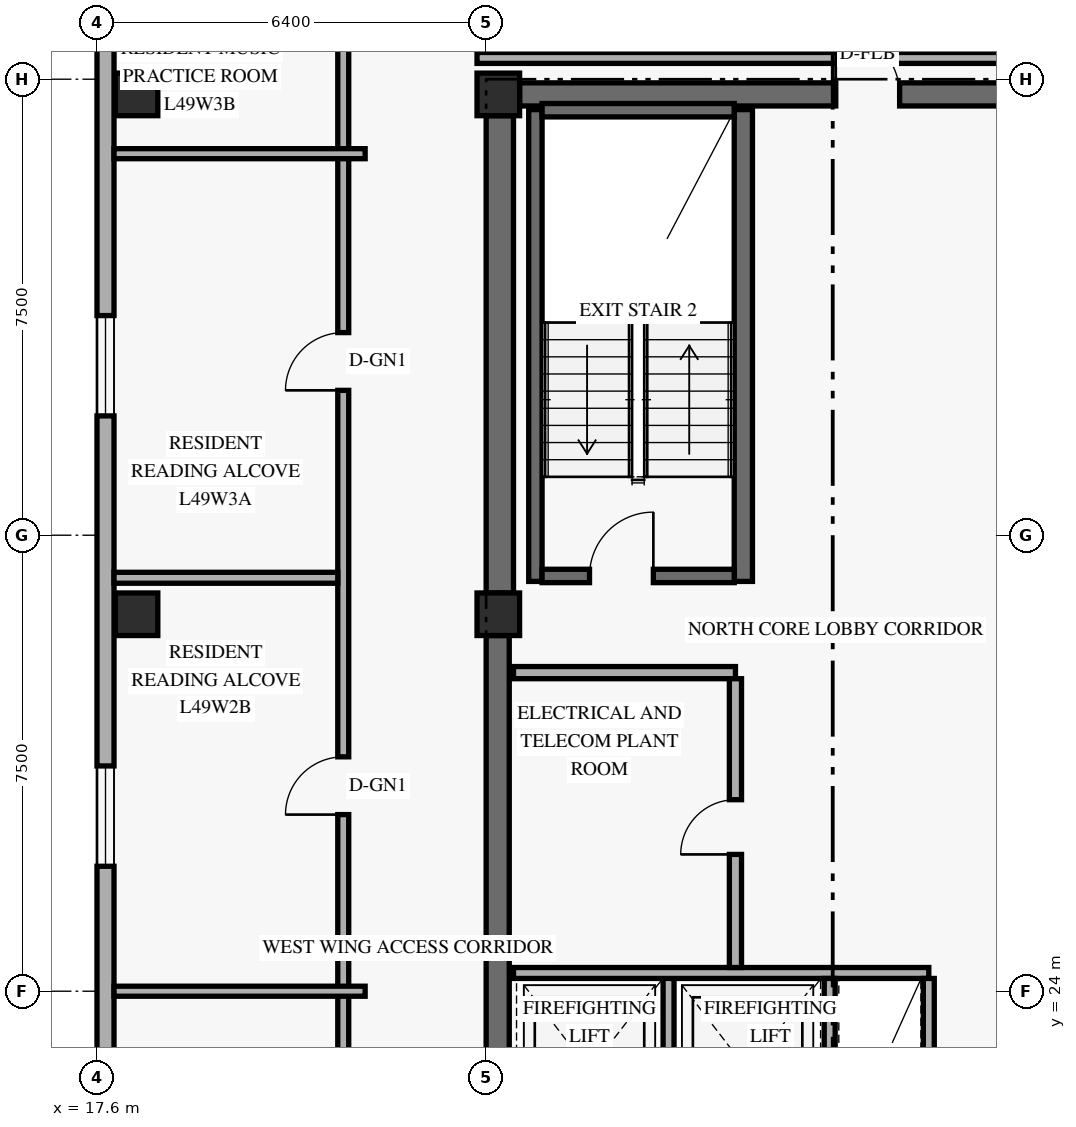
"""IFC4 building model, lengths in metres.
Left out: names, types, materials, properties, quantities, classifications, styles, units other than length and angle.
Written with IfcOpenShell. Run it as: python <this file> out.ifc"""

import sys

from ifc_helpers import new_model, si_unit, direction, frame, frame_2d, origin, origin_2d, place, context, subcontext, project, spatial, rectangle, extrude, element, fill, save


model = new_model("IFC4")
c1 = context("Model", 3, precision=1e-05, world=origin(), true_north=direction((0.0, 1.0)))
c2 = subcontext(c1, "Body", "Model", "MODEL_VIEW")
j1 = project(units=[si_unit("LENGTHUNIT", "METRE"), si_unit("PLANEANGLEUNIT", "RADIAN")], contexts=[c1])
p1 = place(None, origin())
s1 = spatial("IfcSite", under=j1, at=p1, CompositionType="ELEMENT")
p2 = place(p1, origin())
s2 = spatial("IfcBuilding", under=s1, at=p2, CompositionType="ELEMENT")
p3 = place(p2, frame((0.0, 0.0, 188.4)))
s3 = spatial("IfcBuildingStorey", under=s2, at=p3, CompositionType="ELEMENT", Elevation=188.4)
p4 = place(p3, frame((24.19, 17.9, 0.0), z_axis=(0.0, 0.0, 1.0), x_axis=(0.0, 1.0, 0.0)))
e1 = element("IfcWall", 1, at=p4, inside=s3, PredefinedType="SHEAR", context=c2, shape_type="SweptSolid", body=[
    extrude(rectangle(XDim=11.95, YDim=0.38, at=frame_2d((5.975, 0.0))), origin(), (0.0, 0.0, 1.0), 2.738),
])
p5 = place(p3, frame((24.225, 30.55, 0.0), z_axis=(0.0, 0.0, 1.0), x_axis=(0.0, 1.0, 0.0)))
e2 = element("IfcWall", 2, at=p5, inside=s3, PredefinedType="SHEAR", context=c2, shape_type="SweptSolid", body=[
    extrude(rectangle(XDim=7.85, YDim=0.45, at=frame_2d((3.925, 0.0))), origin(), (0.0, 0.0, 1.0), 2.738),
])
p6 = place(p3, frame((24.55, 38.75, 0.0), z_axis=(0.0, 0.0, 1.0), x_axis=(1.0, 0.0, 0.0)))
e3 = element("IfcWall", 3, at=p6, inside=s3, PredefinedType="SHEAR", context=c2, shape_type="SweptSolid", body=[
    extrude(rectangle(XDim=10.3, YDim=0.38, at=frame_2d((5.15, 0.0))), origin(), (0.0, 0.0, 1.0), 3.35),
])
p7 = place(p6, frame((5.2, 0.0, 0.0)))
e4 = element("IfcOpeningElement", 4, at=p7, cuts=e3, PredefinedType="OPENING", context=c2, shape_type="SweptSolid", body=[
    extrude(rectangle(XDim=1.05, YDim=2.15, at=frame_2d((0.525, 1.075))), frame((0.0, 0.2, 0.0), z_axis=(0.0, -1.0, 0.0), x_axis=(1.0, 0.0, 0.0)), (0.0, 0.0, 1.0), 0.4),
])
p8 = place(p3, frame((24.81, 30.74, 0.0), z_axis=(0.0, 0.0, 1.0), x_axis=(0.0, 1.0, 0.0)))
e5 = element("IfcWall", 5, at=p8, inside=s3, PredefinedType="SHEAR", context=c2, shape_type="SweptSolid", body=[
    extrude(rectangle(XDim=7.76, YDim=0.22, at=frame_2d((3.88, 0.0))), origin(), (0.0, 0.0, 1.0), 3.35),
])
p9 = place(p3, frame((28.23, 30.74, 0.0), z_axis=(0.0, 0.0, 1.0), x_axis=(0.0, 1.0, 0.0)))
e6 = element("IfcWall", 6, at=p9, inside=s3, PredefinedType="SHEAR", context=c2, shape_type="SweptSolid", body=[
    extrude(rectangle(XDim=7.76, YDim=0.3, at=frame_2d((3.88, 0.0))), origin(), (0.0, 0.0, 1.0), 3.35),
])
p10 = place(p3, frame((24.92, 30.83, 0.0), z_axis=(0.0, 0.0, 1.0), x_axis=(1.0, 0.0, 0.0)))
e7 = element("IfcWall", 7, at=p10, inside=s3, PredefinedType="SHEAR", context=c2, shape_type="SweptSolid", body=[
    extrude(rectangle(XDim=3.16, YDim=0.22, at=frame_2d((1.58, 0.0))), origin(), (0.0, 0.0, 1.0), 3.35),
])
p11 = place(p10, frame((0.78, 0.0, 0.0)))
e8 = element("IfcOpeningElement", 8, at=p11, cuts=e7, PredefinedType="OPENING", context=c2, shape_type="SweptSolid", body=[
    extrude(rectangle(XDim=1.05, YDim=2.15, at=frame_2d((0.525, 1.075))), frame((0.0, 0.12, 0.0), z_axis=(0.0, -1.0, 0.0), x_axis=(1.0, 0.0, 0.0)), (0.0, 0.0, 1.0), 0.24),
])
p12 = place(p3, frame((24.92, 38.49, 0.0), z_axis=(0.0, 0.0, 1.0), x_axis=(1.0, 0.0, 0.0)))
e9 = element("IfcWall", 9, at=p12, inside=s3, PredefinedType="SHEAR", context=c2, shape_type="SweptSolid", body=[
    extrude(rectangle(XDim=3.16, YDim=0.22, at=frame_2d((1.58, 0.0))), origin(), (0.0, 0.0, 1.0), 3.35),
])
for number, where, z_axis, x_axis in (
    (10, (18.25, 30.2, 0.0), (0.0, 0.0, 1.0), (1.0, 0.0, 0.0)),
    (11, (18.25, 38.75, 0.0), (0.0, 0.0, 1.0), (1.0, 0.0, 0.0)),
    (12, (24.2, 30.2, 0.0), (0.0, 0.0, 1.0), (1.0, 0.0, 0.0)),
    (13, (24.2, 38.75, 0.0), (0.0, 0.0, 1.0), (1.0, 0.0, 0.0)),
):
    element("IfcColumn", number, at=place(p3, frame(where, z_axis=z_axis, x_axis=x_axis)), inside=s3, PredefinedType="COLUMN", context=c2, shape_type="SweptSolid", body=[
        extrude(rectangle(XDim=0.7, YDim=0.7, at=origin_2d()), origin(), (0.0, 0.0, 1.0), 3.6),
    ])
p13 = place(p3, frame((17.74, 40.38, 0.0), z_axis=(0.0, 0.0, 1.0), x_axis=(0.0, -1.0, 0.0)))
e14 = element("IfcWall", 14, at=p13, inside=s3, PredefinedType="SOLIDWALL", context=c2, shape_type="SweptSolid", body=[
    extrude(rectangle(XDim=32.76, YDim=0.28, at=frame_2d((16.38, 0.0))), origin(), (0.0, 0.0, 1.0), 3.35),
])
p14 = place(p13, frame((25.887, 0.0, 0.85)))
e15 = element("IfcOpeningElement", 15, at=p14, cuts=e14, PredefinedType="OPENING", context=c2, shape_type="SweptSolid", body=[
    extrude(rectangle(XDim=1.65, YDim=1.6, at=frame_2d((0.825, 0.8))), frame((0.0, 0.15, 0.0), z_axis=(0.0, -1.0, 0.0), x_axis=(1.0, 0.0, 0.0)), (0.0, 0.0, 1.0), 0.3),
])
p15 = place(p13, frame((18.56, 0.0, 0.85)))
e16 = element("IfcOpeningElement", 16, at=p15, cuts=e14, PredefinedType="OPENING", context=c2, shape_type="SweptSolid", body=[
    extrude(rectangle(XDim=1.65, YDim=1.6, at=frame_2d((0.825, 0.8))), frame((0.0, 0.15, 0.0), z_axis=(0.0, -1.0, 0.0), x_axis=(1.0, 0.0, 0.0)), (0.0, 0.0, 1.0), 0.3),
])
p16 = place(p13, frame((12.675, 0.0, 0.85)))
e17 = element("IfcOpeningElement", 17, at=p16, cuts=e14, PredefinedType="OPENING", context=c2, shape_type="SweptSolid", body=[
    extrude(rectangle(XDim=1.65, YDim=1.6, at=frame_2d((0.825, 0.8))), frame((0.0, 0.15, 0.0), z_axis=(0.0, -1.0, 0.0), x_axis=(1.0, 0.0, 0.0)), (0.0, 0.0, 1.0), 0.3),
])
p17 = place(p13, frame((5.268, 0.0, 0.85)))
e18 = element("IfcOpeningElement", 18, at=p17, cuts=e14, PredefinedType="OPENING", context=c2, shape_type="SweptSolid", body=[
    extrude(rectangle(XDim=1.65, YDim=1.6, at=frame_2d((0.825, 0.8))), frame((0.0, 0.15, 0.0), z_axis=(0.0, -1.0, 0.0), x_axis=(1.0, 0.0, 0.0)), (0.0, 0.0, 1.0), 0.3),
])
p18 = place(p3, frame((27.0, 21.19, 0.0), z_axis=(0.0, 0.0, 1.0), x_axis=(0.0, 1.0, 0.0)))
e19 = element("IfcWall", 19, at=p18, inside=s3, PredefinedType="STANDARD", context=c2, shape_type="SweptSolid", body=[
    extrude(rectangle(XDim=3.11, YDim=0.18, at=frame_2d((1.555, 0.0))), origin(), (0.0, 0.0, 1.0), 3.35),
])
p19 = place(p3, frame((24.45, 24.3, 0.0), z_axis=(0.0, 0.0, 1.0), x_axis=(1.0, 0.0, 0.0)))
e20 = element("IfcWall", 20, at=p19, inside=s3, PredefinedType="STANDARD", context=c2, shape_type="SweptSolid", body=[
    extrude(rectangle(XDim=6.83, YDim=0.18, at=frame_2d((3.415, 0.0))), origin(), (0.0, 0.0, 1.0), 3.35),
])
for number, where, z_axis, x_axis in (
    (21, (29.65, 21.19, 0.0), (0.0, 0.0, 1.0), (0.0, 1.0, 0.0)),
    (22, (31.28, 21.19, 0.0), (0.0, 0.0, 1.0), (0.0, 1.0, 0.0)),
):
    element("IfcWall", number, at=place(p3, frame(where, z_axis=z_axis, x_axis=x_axis)), inside=s3, PredefinedType="STANDARD", context=c2, shape_type="SweptSolid", body=[
        extrude(rectangle(XDim=3.02, YDim=0.18, at=frame_2d((1.51, 0.0))), origin(), (0.0, 0.0, 1.0), 3.35),
    ])
p20 = place(p3, frame((24.45, 29.24, 0.0), z_axis=(0.0, 0.0, 1.0), x_axis=(1.0, 0.0, 0.0)))
e23 = element("IfcWall", 23, at=p20, inside=s3, PredefinedType="STANDARD", context=c2, shape_type="SweptSolid", body=[
    extrude(rectangle(XDim=3.65, YDim=0.2, at=frame_2d((1.825, 0.0))), origin(), (0.0, 0.0, 1.0), 3.35),
])
p21 = place(p3, frame((28.1, 24.39, 0.0), z_axis=(0.0, 0.0, 1.0), x_axis=(0.0, 1.0, 0.0)))
e24 = element("IfcWall", 24, at=p21, inside=s3, PredefinedType="STANDARD", context=c2, shape_type="SweptSolid", body=[
    extrude(rectangle(XDim=4.75, YDim=0.2, at=frame_2d((2.375, 0.0))), origin(), (0.0, 0.0, 1.0), 3.35),
])
p22 = place(p21, frame((1.86, 0.0, 0.0)))
e25 = element("IfcOpeningElement", 25, at=p22, cuts=e24, PredefinedType="OPENING", context=c2, shape_type="SweptSolid", body=[
    extrude(rectangle(XDim=0.9, YDim=2.1, at=frame_2d((0.45, 1.05))), frame((0.0, 0.11, 0.0), z_axis=(0.0, -1.0, 0.0), x_axis=(1.0, 0.0, 0.0)), (0.0, 0.0, 1.0), 0.22),
])
p23 = place(p3, frame((21.65, 6.8, 0.0), z_axis=(0.0, 0.0, 1.0), x_axis=(0.0, 1.0, 0.0)))
e26 = element("IfcWall", 26, at=p23, inside=s3, PredefinedType="STANDARD", context=c2, shape_type="SweptSolid", body=[
    extrude(rectangle(XDim=34.4, YDim=0.18, at=frame_2d((17.2, 0.0))), origin(), (0.0, 0.0, 1.0), 2.72),
])
p24 = place(p23, frame((0.3, 0.0, 0.0)))
e27 = element("IfcOpeningElement", 27, at=p24, cuts=e26, PredefinedType="OPENING", context=c2, shape_type="SweptSolid", body=[
    extrude(rectangle(XDim=0.95, YDim=2.15, at=frame_2d((0.475, 1.075))), frame((0.0, 0.1, 0.0), z_axis=(0.0, -1.0, 0.0), x_axis=(1.0, 0.0, 0.0)), (0.0, 0.0, 1.0), 0.2),
])
p25 = place(p23, frame((6.417, 0.0, 0.0)))
e28 = element("IfcOpeningElement", 28, at=p25, cuts=e26, PredefinedType="OPENING", context=c2, shape_type="SweptSolid", body=[
    extrude(rectangle(XDim=0.95, YDim=2.15, at=frame_2d((0.475, 1.075))), frame((0.0, 0.1, 0.0), z_axis=(0.0, -1.0, 0.0), x_axis=(1.0, 0.0, 0.0)), (0.0, 0.0, 1.0), 0.2),
])
p26 = place(p23, frame((13.395, 0.0, 0.0)))
e29 = element("IfcOpeningElement", 29, at=p26, cuts=e26, PredefinedType="OPENING", context=c2, shape_type="SweptSolid", body=[
    extrude(rectangle(XDim=0.95, YDim=2.15, at=frame_2d((0.475, 1.075))), frame((0.0, 0.1, 0.0), z_axis=(0.0, -1.0, 0.0), x_axis=(1.0, 0.0, 0.0)), (0.0, 0.0, 1.0), 0.2),
])
p27 = place(p23, frame((20.105, 0.0, 0.0)))
e30 = element("IfcOpeningElement", 30, at=p27, cuts=e26, PredefinedType="OPENING", context=c2, shape_type="SweptSolid", body=[
    extrude(rectangle(XDim=0.95, YDim=2.15, at=frame_2d((0.475, 1.075))), frame((0.0, 0.1, 0.0), z_axis=(0.0, -1.0, 0.0), x_axis=(1.0, 0.0, 0.0)), (0.0, 0.0, 1.0), 0.2),
])
p28 = place(p23, frame((27.083, 0.0, 0.0)))
e31 = element("IfcOpeningElement", 31, at=p28, cuts=e26, PredefinedType="OPENING", context=c2, shape_type="SweptSolid", body=[
    extrude(rectangle(XDim=0.95, YDim=2.15, at=frame_2d((0.475, 1.075))), frame((0.0, 0.1, 0.0), z_axis=(0.0, -1.0, 0.0), x_axis=(1.0, 0.0, 0.0)), (0.0, 0.0, 1.0), 0.2),
])
p29 = place(p23, frame((33.19, 0.0, 0.0)))
e32 = element("IfcOpeningElement", 32, at=p29, cuts=e26, PredefinedType="OPENING", context=c2, shape_type="SweptSolid", body=[
    extrude(rectangle(XDim=0.95, YDim=2.15, at=frame_2d((0.475, 1.075))), frame((0.0, 0.1, 0.0), z_axis=(0.0, -1.0, 0.0), x_axis=(1.0, 0.0, 0.0)), (0.0, 0.0, 1.0), 0.2),
])
p30 = place(p3, frame((23.85, 39.35, 0.0), z_axis=(0.0, 0.0, 1.0), x_axis=(1.0, 0.0, 0.0)))
e33 = element("IfcWall", 33, at=p30, inside=s3, PredefinedType="STANDARD", context=c2, shape_type="SweptSolid", body=[
    extrude(rectangle(XDim=11.57, YDim=0.18, at=frame_2d((5.785, 0.0))), origin(), (0.0, 0.0, 1.0), 2.72),
])
p31 = place(p3, frame((17.88, 24.0, 0.0), z_axis=(0.0, 0.0, 1.0), x_axis=(1.0, 0.0, 0.0)))
e34 = element("IfcWall", 34, at=p31, inside=s3, PredefinedType="PARTITIONING", context=c2, shape_type="SweptSolid", body=[
    extrude(rectangle(XDim=4.13, YDim=0.165, at=frame_2d((2.065, 0.0))), origin(), (0.0, 0.0, 1.0), 2.869),
])
p32 = place(p3, frame((17.88, 30.8, 0.0), z_axis=(0.0, 0.0, 1.0), x_axis=(1.0, 0.0, 0.0)))
e35 = element("IfcWall", 35, at=p32, inside=s3, PredefinedType="PARTITIONING", context=c2, shape_type="SweptSolid", body=[
    extrude(rectangle(XDim=3.68, YDim=0.18, at=frame_2d((1.84, 0.0))), origin(), (0.0, 0.0, 1.0), 2.869),
])
p33 = place(p3, frame((17.88, 37.775, 0.0), z_axis=(0.0, 0.0, 1.0), x_axis=(1.0, 0.0, 0.0)))
e36 = element("IfcWall", 36, at=p33, inside=s3, PredefinedType="PARTITIONING", context=c2, shape_type="SweptSolid", body=[
    extrude(rectangle(XDim=4.13, YDim=0.165, at=frame_2d((2.065, 0.0))), origin(), (0.0, 0.0, 1.0), 2.869),
])
p34 = place(p16, origin())
e37 = element("IfcWindow", 37, at=p34, inside=s3, PartitioningType="SINGLE_PANEL", PredefinedType="WINDOW", context=c2, shape_type="SweptSolid", body=[
    extrude(rectangle(XDim=1.65, YDim=1.6, at=frame_2d((0.825, 0.8))), frame((0.0, 0.03, 0.0), z_axis=(0.0, -1.0, 0.0), x_axis=(1.0, 0.0, 0.0)), (0.0, 0.0, 1.0), 0.06),
])
fill(e17, e37)
p35 = place(p17, origin())
e38 = element("IfcWindow", 38, at=p35, inside=s3, PartitioningType="SINGLE_PANEL", PredefinedType="WINDOW", context=c2, shape_type="SweptSolid", body=[
    extrude(rectangle(XDim=1.65, YDim=1.6, at=frame_2d((0.825, 0.8))), frame((0.0, 0.03, 0.0), z_axis=(0.0, -1.0, 0.0), x_axis=(1.0, 0.0, 0.0)), (0.0, 0.0, 1.0), 0.06),
])
fill(e18, e38)
p36 = place(p11, origin())
e39 = element("IfcDoor", 39, at=p36, inside=s3, OperationType="SINGLE_SWING_RIGHT", PredefinedType="DOOR", context=c2, shape_type="SweptSolid", body=[
    extrude(rectangle(XDim=1.05, YDim=2.15, at=frame_2d((0.525, 1.075))), frame((0.0, 0.025, 0.0), z_axis=(0.0, -1.0, 0.0), x_axis=(1.0, 0.0, 0.0)), (0.0, 0.0, 1.0), 0.05),
])
fill(e8, e39)
p37 = place(p22, origin())
e40 = element("IfcDoor", 40, at=p37, inside=s3, OperationType="SINGLE_SWING_LEFT", PredefinedType="DOOR", context=c2, shape_type="SweptSolid", body=[
    extrude(rectangle(XDim=0.9, YDim=2.1, at=frame_2d((0.45, 1.05))), frame((0.0, 0.025, 0.0), z_axis=(0.0, -1.0, 0.0), x_axis=(1.0, 0.0, 0.0)), (0.0, 0.0, 1.0), 0.05),
])
fill(e25, e40)
p38 = place(p7, frame((1.05, 0.0, 0.0), z_axis=(0.0, 0.0, 1.0), x_axis=(-1.0, 0.0, 0.0)))
e41 = element("IfcDoor", 41, at=p38, inside=s3, OperationType="SINGLE_SWING_RIGHT", PredefinedType="DOOR", context=c2, shape_type="SweptSolid", body=[
    extrude(rectangle(XDim=1.05, YDim=2.15, at=frame_2d((0.525, 1.075))), frame((0.0, 0.025, 0.0), z_axis=(0.0, -1.0, 0.0), x_axis=(1.0, 0.0, 0.0)), (0.0, 0.0, 1.0), 0.05),
])
fill(e4, e41)
p39 = place(p27, origin())
e42 = element("IfcDoor", 42, at=p39, inside=s3, OperationType="SINGLE_SWING_LEFT", PredefinedType="DOOR", context=c2, shape_type="SweptSolid", body=[
    extrude(rectangle(XDim=0.95, YDim=2.15, at=frame_2d((0.475, 1.075))), frame((0.0, 0.025, 0.0), z_axis=(0.0, -1.0, 0.0), x_axis=(1.0, 0.0, 0.0)), (0.0, 0.0, 1.0), 0.05),
])
fill(e30, e42)
p40 = place(p28, origin())
e43 = element("IfcDoor", 43, at=p40, inside=s3, OperationType="SINGLE_SWING_LEFT", PredefinedType="DOOR", context=c2, shape_type="SweptSolid", body=[
    extrude(rectangle(XDim=0.95, YDim=2.15, at=frame_2d((0.475, 1.075))), frame((0.0, 0.025, 0.0), z_axis=(0.0, -1.0, 0.0), x_axis=(1.0, 0.0, 0.0)), (0.0, 0.0, 1.0), 0.05),
])
fill(e31, e43)
save(model, sys.argv[1])
